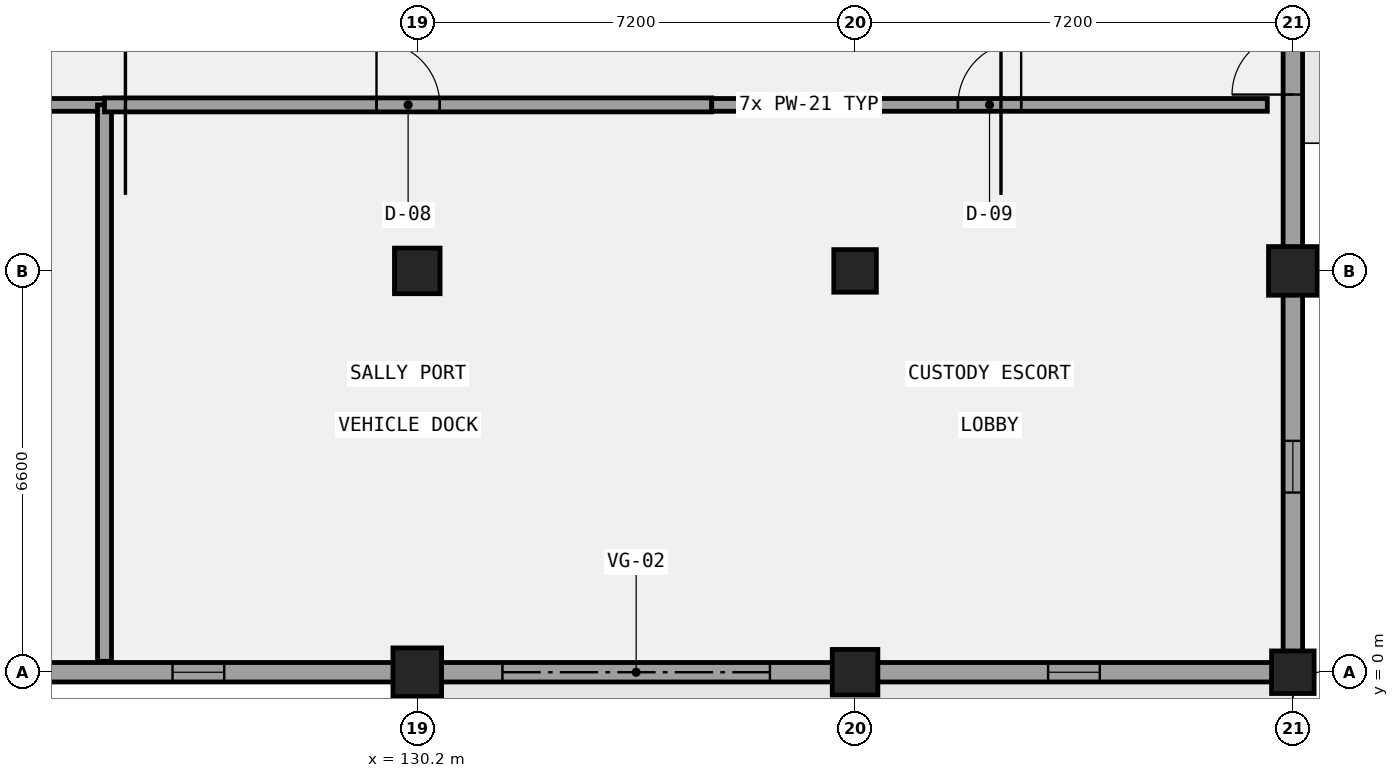
"""IFC4 building model, lengths in metres.
Left out: names, types, materials, properties, quantities, classifications, styles, units other than length and angle.
Written with IfcOpenShell. Run it as: python <this file> out.ifc"""

import sys

from ifc_helpers import new_model, si_unit, direction, frame, frame_2d, origin, origin_2d, place, context, subcontext, project, spatial, rectangle, extrude, element, fill, save


model = new_model("IFC4")
c1 = context("Model", 3, precision=1e-05, world=origin(), true_north=direction((0.0, 1.0)))
c2 = subcontext(c1, "Body", "Model", "MODEL_VIEW")
j1 = project(units=[si_unit("LENGTHUNIT", "METRE"), si_unit("PLANEANGLEUNIT", "RADIAN")], contexts=[c1])
p1 = place(None, origin())
s1 = spatial("IfcSite", under=j1, at=p1, CompositionType="ELEMENT")
p2 = place(p1, origin())
s2 = spatial("IfcBuilding", under=s1, at=p2, CompositionType="ELEMENT")
p3 = place(p2, origin())
s3 = spatial("IfcBuildingStorey", under=s2, at=p3, CompositionType="ELEMENT", Elevation=0.0)
p4 = place(p3, frame((130.2, 0.0, -0.32), z_axis=(0.0, 0.0, 1.0), x_axis=(1.0, 0.0, 0.0)))
e1 = element("IfcColumn", 1, at=p4, inside=s3, PredefinedType="COLUMN", context=c2, shape_type="SweptSolid", body=[
    extrude(rectangle(XDim=0.8, YDim=0.8, at=origin_2d()), origin(), (0.0, 0.0, 1.0), 5.72),
])
for number, where, z_axis, x_axis in (
    (2, (130.2, 6.6, -0.32), (0.0, 0.0, 1.0), (1.0, 0.0, 0.0)),
    (3, (137.4, 0.0, -0.32), (0.0, 0.0, 1.0), (1.0, 0.0, 0.0)),
):
    element("IfcColumn", number, at=place(p3, frame(where, z_axis=z_axis, x_axis=x_axis)), inside=s3, PredefinedType="COLUMN", context=c2, shape_type="SweptSolid", body=[
        extrude(rectangle(XDim=0.75, YDim=0.75, at=origin_2d()), origin(), (0.0, 0.0, 1.0), 5.72),
    ])
for number, where, z_axis, x_axis in (
    (4, (137.4, 6.6, -0.32), (0.0, 0.0, 1.0), (1.0, 0.0, 0.0)),
    (5, (144.6, 0.0, -0.32), (0.0, 0.0, 1.0), (1.0, 0.0, 0.0)),
):
    element("IfcColumn", number, at=place(p3, frame(where, z_axis=z_axis, x_axis=x_axis)), inside=s3, PredefinedType="COLUMN", context=c2, shape_type="SweptSolid", body=[
        extrude(rectangle(XDim=0.7, YDim=0.7, at=origin_2d()), origin(), (0.0, 0.0, 1.0), 5.72),
    ])
p5 = place(p3, frame((144.6, 6.6, -0.32), z_axis=(0.0, 0.0, 1.0), x_axis=(1.0, 0.0, 0.0)))
e6 = element("IfcColumn", 6, at=p5, inside=s3, PredefinedType="COLUMN", context=c2, shape_type="SweptSolid", body=[
    extrude(rectangle(XDim=0.8, YDim=0.8, at=origin_2d()), origin(), (0.0, 0.0, 1.0), 5.72),
])
p6 = place(p3, frame((79.64, 0.0, 0.0), z_axis=(0.0, 0.0, 1.0), x_axis=(1.0, 0.0, 0.0)))
e7 = element("IfcWall", 7, at=p6, inside=s3, PredefinedType="SOLIDWALL", context=c2, shape_type="SweptSolid", body=[
    extrude(rectangle(XDim=65.12, YDim=0.32, at=frame_2d((32.56, 0.0))), origin(), (0.0, 0.0, 1.0), 4.37),
])
p7 = place(p6, frame((51.96, 0.0, 0.0)))
e8 = element("IfcOpeningElement", 8, at=p7, cuts=e7, PredefinedType="OPENING", context=c2, shape_type="SweptSolid", body=[
    extrude(rectangle(XDim=4.4, YDim=3.8, at=frame_2d((2.2, 1.9))), frame((0.0, 0.17, 0.0), z_axis=(0.0, -1.0, 0.0), x_axis=(1.0, 0.0, 0.0)), (0.0, 0.0, 1.0), 0.34),
])
p8 = place(p6, frame((31.66, 0.0, 0.0)))
e9 = element("IfcOpeningElement", 9, at=p8, cuts=e7, PredefinedType="OPENING", context=c2, shape_type="SweptSolid", body=[
    extrude(rectangle(XDim=1.8, YDim=2.4, at=frame_2d((0.9, 1.2))), frame((0.0, 0.17, 0.0), z_axis=(0.0, -1.0, 0.0), x_axis=(1.0, 0.0, 0.0)), (0.0, 0.0, 1.0), 0.34),
])
p9 = place(p6, frame((3.335, 0.0, 1.0)))
e10 = element("IfcOpeningElement", 10, at=p9, cuts=e7, PredefinedType="OPENING", context=c2, shape_type="SweptSolid", body=[
    extrude(rectangle(XDim=0.85, YDim=1.65, at=frame_2d((0.425, 0.825))), frame((0.0, 0.17, 0.0), z_axis=(0.0, -1.0, 0.0), x_axis=(1.0, 0.0, 0.0)), (0.0, 0.0, 1.0), 0.34),
])
p10 = place(p6, frame((10.535, 0.0, 1.0)))
e11 = element("IfcOpeningElement", 11, at=p10, cuts=e7, PredefinedType="OPENING", context=c2, shape_type="SweptSolid", body=[
    extrude(rectangle(XDim=0.85, YDim=1.65, at=frame_2d((0.425, 0.825))), frame((0.0, 0.17, 0.0), z_axis=(0.0, -1.0, 0.0), x_axis=(1.0, 0.0, 0.0)), (0.0, 0.0, 1.0), 0.34),
])
p11 = place(p6, frame((17.735, 0.0, 1.0)))
e12 = element("IfcOpeningElement", 12, at=p11, cuts=e7, PredefinedType="OPENING", context=c2, shape_type="SweptSolid", body=[
    extrude(rectangle(XDim=0.85, YDim=1.65, at=frame_2d((0.425, 0.825))), frame((0.0, 0.17, 0.0), z_axis=(0.0, -1.0, 0.0), x_axis=(1.0, 0.0, 0.0)), (0.0, 0.0, 1.0), 0.34),
])
p12 = place(p6, frame((24.935, 0.0, 1.0)))
e13 = element("IfcOpeningElement", 13, at=p12, cuts=e7, PredefinedType="OPENING", context=c2, shape_type="SweptSolid", body=[
    extrude(rectangle(XDim=0.85, YDim=1.65, at=frame_2d((0.425, 0.825))), frame((0.0, 0.17, 0.0), z_axis=(0.0, -1.0, 0.0), x_axis=(1.0, 0.0, 0.0)), (0.0, 0.0, 1.0), 0.34),
])
p13 = place(p6, frame((39.335, 0.0, 1.0)))
e14 = element("IfcOpeningElement", 14, at=p13, cuts=e7, PredefinedType="OPENING", context=c2, shape_type="SweptSolid", body=[
    extrude(rectangle(XDim=0.85, YDim=1.65, at=frame_2d((0.425, 0.825))), frame((0.0, 0.17, 0.0), z_axis=(0.0, -1.0, 0.0), x_axis=(1.0, 0.0, 0.0)), (0.0, 0.0, 1.0), 0.34),
])
p14 = place(p6, frame((46.535, 0.0, 1.0)))
e15 = element("IfcOpeningElement", 15, at=p14, cuts=e7, PredefinedType="OPENING", context=c2, shape_type="SweptSolid", body=[
    extrude(rectangle(XDim=0.85, YDim=1.65, at=frame_2d((0.425, 0.825))), frame((0.0, 0.17, 0.0), z_axis=(0.0, -1.0, 0.0), x_axis=(1.0, 0.0, 0.0)), (0.0, 0.0, 1.0), 0.34),
])
p15 = place(p6, frame((60.935, 0.0, 1.0)))
e16 = element("IfcOpeningElement", 16, at=p15, cuts=e7, PredefinedType="OPENING", context=c2, shape_type="SweptSolid", body=[
    extrude(rectangle(XDim=0.85, YDim=1.65, at=frame_2d((0.425, 0.825))), frame((0.0, 0.17, 0.0), z_axis=(0.0, -1.0, 0.0), x_axis=(1.0, 0.0, 0.0)), (0.0, 0.0, 1.0), 0.34),
])
p16 = place(p3, frame((144.6, 0.16, 0.0), z_axis=(0.0, 0.0, 1.0), x_axis=(0.0, 1.0, 0.0)))
e17 = element("IfcWall", 17, at=p16, inside=s3, PredefinedType="SOLIDWALL", context=c2, shape_type="SweptSolid", body=[
    extrude(rectangle(XDim=20.68, YDim=0.32, at=frame_2d((10.34, 0.0))), origin(), (0.0, 0.0, 1.0), 4.12),
])
p17 = place(p16, frame((9.34, 0.0, 0.0)))
e18 = element("IfcOpeningElement", 18, at=p17, cuts=e17, PredefinedType="OPENING", context=c2, shape_type="SweptSolid", body=[
    extrude(rectangle(XDim=2.0, YDim=2.6, at=frame_2d((1.0, 1.3))), frame((0.0, 0.17, 0.0), z_axis=(0.0, -1.0, 0.0), x_axis=(1.0, 0.0, 0.0)), (0.0, 0.0, 1.0), 0.34),
])
p18 = place(p16, frame((2.795, 0.0, 1.0)))
e19 = element("IfcOpeningElement", 19, at=p18, cuts=e17, PredefinedType="OPENING", context=c2, shape_type="SweptSolid", body=[
    extrude(rectangle(XDim=0.85, YDim=1.9, at=frame_2d((0.425, 0.95))), frame((0.0, 0.17, 0.0), z_axis=(0.0, -1.0, 0.0), x_axis=(1.0, 0.0, 0.0)), (0.0, 0.0, 1.0), 0.34),
])
p19 = place(p16, frame((16.735, 0.0, 1.0)))
e20 = element("IfcOpeningElement", 20, at=p19, cuts=e17, PredefinedType="OPENING", context=c2, shape_type="SweptSolid", body=[
    extrude(rectangle(XDim=0.85, YDim=1.9, at=frame_2d((0.425, 0.95))), frame((0.0, 0.17, 0.0), z_axis=(0.0, -1.0, 0.0), x_axis=(1.0, 0.0, 0.0)), (0.0, 0.0, 1.0), 0.34),
])
p20 = place(p3, frame((116.769, 9.33, 0.0), z_axis=(0.0, 0.0, 1.0), x_axis=(1.0, 0.0, 0.0)))
e21 = element("IfcWall", 21, at=p20, inside=s3, PredefinedType="PARTITIONING", context=c2, shape_type="SweptSolid", body=[
    extrude(rectangle(XDim=8.287, YDim=0.21, at=frame_2d((4.144, 0.0))), origin(), (0.0, 0.0, 1.0), 5.12),
])
p21 = place(p20, frame((3.624, 0.0, 0.0)))
e22 = element("IfcOpeningElement", 22, at=p21, cuts=e21, PredefinedType="OPENING", context=c2, shape_type="SweptSolid", body=[
    extrude(rectangle(XDim=1.04, YDim=2.1, at=frame_2d((0.52, 1.05))), frame((0.0, 0.115, 0.0), z_axis=(0.0, -1.0, 0.0), x_axis=(1.0, 0.0, 0.0)), (0.0, 0.0, 1.0), 0.23),
])
p22 = place(p3, frame((125.056, 0.18, 0.0), z_axis=(0.0, 0.0, 1.0), x_axis=(0.0, 1.0, 0.0)))
e23 = element("IfcWall", 23, at=p22, inside=s3, PredefinedType="PARTITIONING", context=c2, shape_type="SweptSolid", body=[
    extrude(rectangle(XDim=9.15, YDim=0.23, at=frame_2d((4.575, 0.0))), origin(), (0.0, 0.0, 1.0), 5.12),
])
p23 = place(p3, frame((125.056, 9.33, 0.0), z_axis=(0.0, 0.0, 1.0), x_axis=(1.0, 0.0, 0.0)))
e24 = element("IfcWall", 24, at=p23, inside=s3, PredefinedType="PARTITIONING", context=c2, shape_type="SweptSolid", body=[
    extrude(rectangle(XDim=9.987, YDim=0.23, at=frame_2d((4.994, 0.0))), origin(), (0.0, 0.0, 1.0), 5.12),
])
p24 = place(p23, frame((4.473, 0.0, 0.0)))
e25 = element("IfcOpeningElement", 25, at=p24, cuts=e24, PredefinedType="OPENING", context=c2, shape_type="SweptSolid", body=[
    extrude(rectangle(XDim=1.04, YDim=2.22, at=frame_2d((0.52, 1.11))), frame((0.0, 0.125, 0.0), z_axis=(0.0, -1.0, 0.0), x_axis=(1.0, 0.0, 0.0)), (0.0, 0.0, 1.0), 0.25),
])
p25 = place(p3, frame((135.043, 9.33, 0.0), z_axis=(0.0, 0.0, 1.0), x_axis=(1.0, 0.0, 0.0)))
e26 = element("IfcWall", 26, at=p25, inside=s3, PredefinedType="PARTITIONING", context=c2, shape_type="SweptSolid", body=[
    extrude(rectangle(XDim=9.137, YDim=0.21, at=frame_2d((4.568, 0.0))), origin(), (0.0, 0.0, 1.0), 5.12),
])
p26 = place(p25, frame((4.049, 0.0, 0.0)))
e27 = element("IfcOpeningElement", 27, at=p26, cuts=e26, PredefinedType="OPENING", context=c2, shape_type="SweptSolid", body=[
    extrude(rectangle(XDim=1.04, YDim=2.35, at=frame_2d((0.52, 1.175))), frame((0.0, 0.115, 0.0), z_axis=(0.0, -1.0, 0.0), x_axis=(1.0, 0.0, 0.0)), (0.0, 0.0, 1.0), 0.23),
])
p27 = place(p7, frame((4.4, 0.0, 0.0), z_axis=(0.0, 0.0, 1.0), x_axis=(-1.0, 0.0, 0.0)))
e28 = element("IfcDoor", 28, at=p27, inside=s3, OperationType="ROLLINGUP", PredefinedType="GATE", context=c2, shape_type="SweptSolid", body=[
    extrude(rectangle(XDim=4.4, YDim=3.8, at=frame_2d((2.2, 1.9))), frame((0.0, 0.025, 0.0), z_axis=(0.0, -1.0, 0.0), x_axis=(1.0, 0.0, 0.0)), (0.0, 0.0, 1.0), 0.05),
])
fill(e8, e28)
p28 = place(p14, origin())
e29 = element("IfcWindow", 29, at=p28, inside=s3, PartitioningType="SINGLE_PANEL", PredefinedType="WINDOW", context=c2, shape_type="SweptSolid", body=[
    extrude(rectangle(XDim=0.85, YDim=1.65, at=frame_2d((0.425, 0.825))), frame((0.0, 0.03, 0.0), z_axis=(0.0, -1.0, 0.0), x_axis=(1.0, 0.0, 0.0)), (0.0, 0.0, 1.0), 0.06),
])
fill(e15, e29)
p29 = place(p15, origin())
e30 = element("IfcWindow", 30, at=p29, inside=s3, PartitioningType="SINGLE_PANEL", PredefinedType="WINDOW", context=c2, shape_type="SweptSolid", body=[
    extrude(rectangle(XDim=0.85, YDim=1.65, at=frame_2d((0.425, 0.825))), frame((0.0, 0.03, 0.0), z_axis=(0.0, -1.0, 0.0), x_axis=(1.0, 0.0, 0.0)), (0.0, 0.0, 1.0), 0.06),
])
fill(e16, e30)
p30 = place(p17, frame((2.0, 0.0, 0.0), z_axis=(0.0, 0.0, 1.0), x_axis=(-1.0, 0.0, 0.0)))
e31 = element("IfcDoor", 31, at=p30, inside=s3, OperationType="DOUBLE_DOOR_SINGLE_SWING", PredefinedType="DOOR", context=c2, shape_type="SweptSolid", body=[
    extrude(rectangle(XDim=2.0, YDim=2.6, at=frame_2d((1.0, 1.3))), frame((0.0, 0.025, 0.0), z_axis=(0.0, -1.0, 0.0), x_axis=(1.0, 0.0, 0.0)), (0.0, 0.0, 1.0), 0.05),
])
fill(e18, e31)
p31 = place(p18, origin())
e32 = element("IfcWindow", 32, at=p31, inside=s3, PartitioningType="SINGLE_PANEL", PredefinedType="WINDOW", context=c2, shape_type="SweptSolid", body=[
    extrude(rectangle(XDim=0.85, YDim=1.9, at=frame_2d((0.425, 0.95))), frame((0.0, 0.03, 0.0), z_axis=(0.0, -1.0, 0.0), x_axis=(1.0, 0.0, 0.0)), (0.0, 0.0, 1.0), 0.06),
])
fill(e19, e32)
p32 = place(p24, frame((1.04, 0.0, 0.0), z_axis=(0.0, 0.0, 1.0), x_axis=(-1.0, 0.0, 0.0)))
e33 = element("IfcDoor", 33, at=p32, inside=s3, OperationType="SINGLE_SWING_LEFT", PredefinedType="DOOR", context=c2, shape_type="SweptSolid", body=[
    extrude(rectangle(XDim=1.04, YDim=2.22, at=frame_2d((0.52, 1.11))), frame((0.0, 0.025, 0.0), z_axis=(0.0, -1.0, 0.0), x_axis=(1.0, 0.0, 0.0)), (0.0, 0.0, 1.0), 0.05),
])
fill(e25, e33)
p33 = place(p26, frame((1.04, 0.0, 0.0), z_axis=(0.0, 0.0, 1.0), x_axis=(-1.0, 0.0, 0.0)))
e34 = element("IfcDoor", 34, at=p33, inside=s3, OperationType="SINGLE_SWING_RIGHT", PredefinedType="DOOR", context=c2, shape_type="SweptSolid", body=[
    extrude(rectangle(XDim=1.04, YDim=2.35, at=frame_2d((0.52, 1.175))), frame((0.0, 0.025, 0.0), z_axis=(0.0, -1.0, 0.0), x_axis=(1.0, 0.0, 0.0)), (0.0, 0.0, 1.0), 0.05),
])
fill(e27, e34)
save(model, sys.argv[1])
